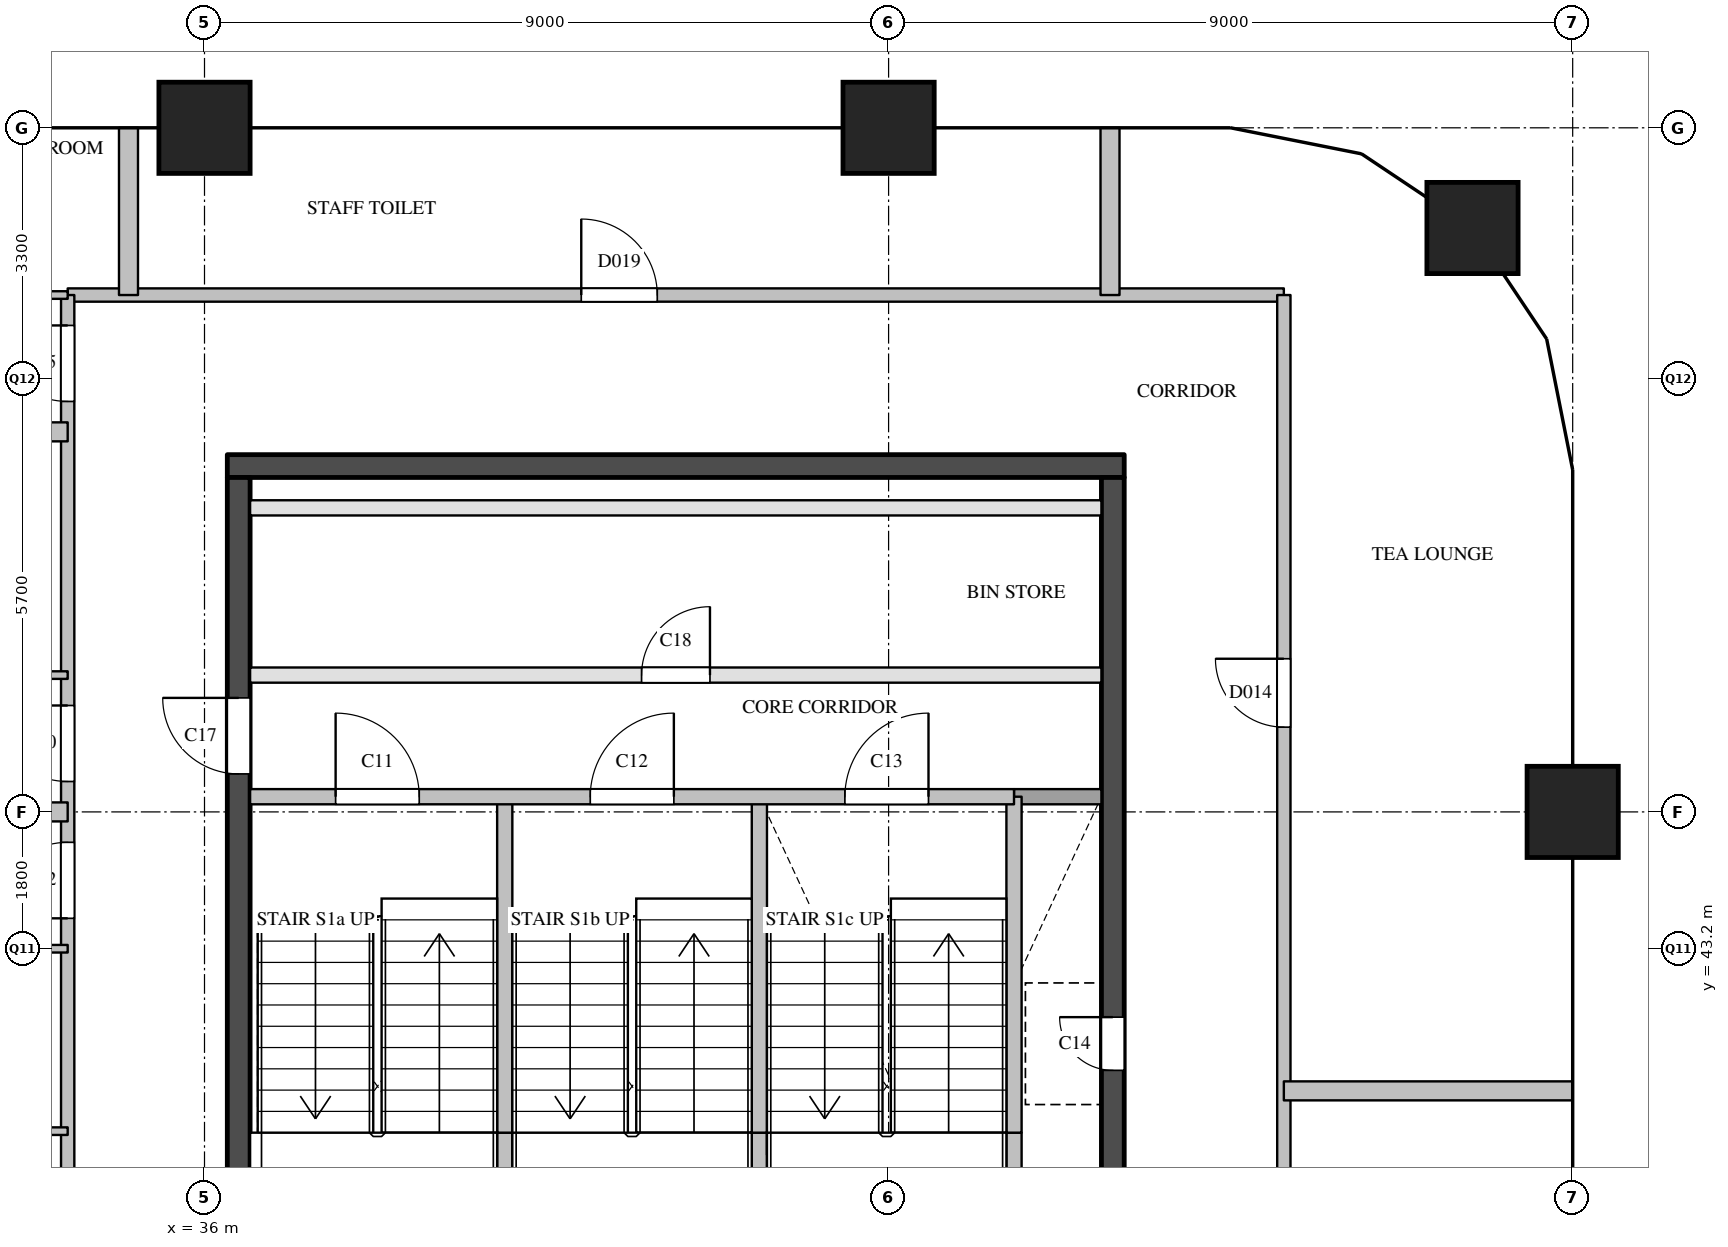
"""IFC4 building model, lengths in metres.
Left out: names, types, materials, properties, quantities, classifications, styles, units other than length and angle.
Written with IfcOpenShell. Run it as: python <this file> out.ifc"""

import sys

from ifc_helpers import new_model, si_unit, direction, frame, frame_2d, origin, origin_2d, place, context, subcontext, project, spatial, rectangle, extrude, element, fill, save


model = new_model("IFC4")
c1 = context("Model", 3, precision=1e-05, world=origin(), true_north=direction((0.0, 1.0)))
c2 = subcontext(c1, "Body", "Model", "MODEL_VIEW")
j1 = project(units=[si_unit("LENGTHUNIT", "METRE"), si_unit("PLANEANGLEUNIT", "RADIAN")], contexts=[c1])
p1 = place(None, origin())
s1 = spatial("IfcSite", under=j1, at=p1, CompositionType="ELEMENT")
p2 = place(p1, origin())
s2 = spatial("IfcBuilding", under=s1, at=p2, CompositionType="ELEMENT")
p3 = place(p2, frame((0.0, 0.0, 301.2)))
s3 = spatial("IfcBuildingStorey", under=s2, at=p3, CompositionType="ELEMENT", Elevation=301.2)
for number, where, z_axis, x_axis in (
    (1, (36.0, 54.0, 0.0), (0.0, 0.0, 1.0), (1.0, 0.0, 0.0)),
    (2, (45.0, 54.0, 0.0), (0.0, 0.0, 1.0), (1.0, 0.0, 0.0)),
    (3, (54.0, 45.0, 0.0), (0.0, 0.0, 1.0), (1.0, 0.0, 0.0)),
    (4, (52.682, 52.682, 0.0), (0.0, 0.0, 1.0), (1.0, 0.0, 0.0)),
):
    element("IfcColumn", number, at=place(p3, frame(where, z_axis=z_axis, x_axis=x_axis)), inside=s3, PredefinedType="COLUMN", context=c2, shape_type="SweptSolid", body=[
        extrude(rectangle(XDim=1.2, YDim=1.2, at=origin_2d()), origin(), (0.0, 0.0, 1.0), 3.9),
    ])
p4 = place(p3, frame((36.3, 49.55, 0.0), z_axis=(0.0, 0.0, 1.0), x_axis=(1.0, 0.0, 0.0)))
e5 = element("IfcWall", 5, at=p4, inside=s3, PredefinedType="SHEAR", context=c2, shape_type="SweptSolid", body=[
    extrude(rectangle(XDim=11.8, YDim=0.3, at=frame_2d((5.9, 0.0))), origin(), (0.0, 0.0, 1.0), 3.6),
])
p5 = place(p3, frame((36.45, 29.1, 0.0), z_axis=(0.0, 0.0, 1.0), x_axis=(0.0, 1.0, 0.0)))
e6 = element("IfcWall", 6, at=p5, inside=s3, PredefinedType="SHEAR", context=c2, shape_type="SweptSolid", body=[
    extrude(rectangle(XDim=20.3, YDim=0.3, at=frame_2d((10.15, 0.0))), origin(), (0.0, 0.0, 1.0), 3.6),
])
p6 = place(p5, frame((3.6, 0.0, 0.0)))
e7 = element("IfcOpeningElement", 7, at=p6, cuts=e6, PredefinedType="OPENING", context=c2, shape_type="SweptSolid", body=[
    extrude(rectangle(XDim=1.8, YDim=2.1, at=frame_2d((0.9, 1.05))), frame((0.0, 0.16, 0.0), z_axis=(0.0, -1.0, 0.0), x_axis=(1.0, 0.0, 0.0)), (0.0, 0.0, 1.0), 0.32),
])
p7 = place(p5, frame((16.4, 0.0, 0.0)))
e8 = element("IfcOpeningElement", 8, at=p7, cuts=e6, PredefinedType="OPENING", context=c2, shape_type="SweptSolid", body=[
    extrude(rectangle(XDim=1.0, YDim=2.1, at=frame_2d((0.5, 1.05))), frame((0.0, 0.16, 0.0), z_axis=(0.0, -1.0, 0.0), x_axis=(1.0, 0.0, 0.0)), (0.0, 0.0, 1.0), 0.32),
])
p8 = place(p3, frame((47.95, 29.1, 0.0), z_axis=(0.0, 0.0, 1.0), x_axis=(0.0, 1.0, 0.0)))
e9 = element("IfcWall", 9, at=p8, inside=s3, PredefinedType="SHEAR", context=c2, shape_type="SweptSolid", body=[
    extrude(rectangle(XDim=20.3, YDim=0.3, at=frame_2d((10.15, 0.0))), origin(), (0.0, 0.0, 1.0), 3.6),
])
p9 = place(p8, frame((12.5, 0.0, 0.0)))
e10 = element("IfcOpeningElement", 10, at=p9, cuts=e9, PredefinedType="OPENING", context=c2, shape_type="SweptSolid", body=[
    extrude(rectangle(XDim=0.7, YDim=2.1, at=frame_2d((0.35, 1.05))), frame((0.0, 0.16, 0.0), z_axis=(0.0, -1.0, 0.0), x_axis=(1.0, 0.0, 0.0)), (0.0, 0.0, 1.0), 0.32),
])
p10 = place(p8, frame((3.9, 0.0, 0.0)))
e11 = element("IfcOpeningElement", 11, at=p10, cuts=e9, PredefinedType="OPENING", context=c2, shape_type="SweptSolid", body=[
    extrude(rectangle(XDim=1.8, YDim=2.1, at=frame_2d((0.9, 1.05))), frame((0.0, 0.16, 0.0), z_axis=(0.0, -1.0, 0.0), x_axis=(1.0, 0.0, 0.0)), (0.0, 0.0, 1.0), 0.32),
])
p11 = place(p3, frame((39.95, 39.0, 0.0), z_axis=(0.0, 0.0, 1.0), x_axis=(0.0, 1.0, 0.0)))
e12 = element("IfcWall", 12, at=p11, inside=s3, PredefinedType="SOLIDWALL", context=c2, shape_type="SweptSolid", body=[
    extrude(rectangle(XDim=1.78, YDim=0.2, at=frame_2d((0.89, 0.0))), origin(), (0.0, 0.0, 1.0), 3.6),
])
p12 = place(p3, frame((39.95, 40.78, 0.0), z_axis=(0.0, 0.0, 1.0), x_axis=(0.0, 1.0, 0.0)))
e13 = element("IfcWall", 13, at=p12, inside=s3, PredefinedType="SOLIDWALL", context=c2, shape_type="SweptSolid", body=[
    extrude(rectangle(XDim=4.42, YDim=0.2, at=frame_2d((2.21, 0.0))), origin(), (0.0, 0.0, 1.0), 3.6),
])
p13 = place(p3, frame((43.3, 39.0, 0.0), z_axis=(0.0, 0.0, 1.0), x_axis=(0.0, 1.0, 0.0)))
e14 = element("IfcWall", 14, at=p13, inside=s3, PredefinedType="SOLIDWALL", context=c2, shape_type="SweptSolid", body=[
    extrude(rectangle(XDim=1.78, YDim=0.2, at=frame_2d((0.89, 0.0))), origin(), (0.0, 0.0, 1.0), 3.6),
])
p14 = place(p3, frame((43.3, 40.78, 0.0), z_axis=(0.0, 0.0, 1.0), x_axis=(0.0, 1.0, 0.0)))
e15 = element("IfcWall", 15, at=p14, inside=s3, PredefinedType="SOLIDWALL", context=c2, shape_type="SweptSolid", body=[
    extrude(rectangle(XDim=4.42, YDim=0.2, at=frame_2d((2.21, 0.0))), origin(), (0.0, 0.0, 1.0), 3.6),
])
p15 = place(p3, frame((46.65, 39.0, 0.0), z_axis=(0.0, 0.0, 1.0), x_axis=(0.0, 1.0, 0.0)))
e16 = element("IfcWall", 16, at=p15, inside=s3, PredefinedType="SOLIDWALL", context=c2, shape_type="SweptSolid", body=[
    extrude(rectangle(XDim=1.78, YDim=0.2, at=frame_2d((0.89, 0.0))), origin(), (0.0, 0.0, 1.0), 3.6),
])
p16 = place(p3, frame((46.65, 40.78, 0.0), z_axis=(0.0, 0.0, 1.0), x_axis=(0.0, 1.0, 0.0)))
e17 = element("IfcWall", 17, at=p16, inside=s3, PredefinedType="SOLIDWALL", context=c2, shape_type="SweptSolid", body=[
    extrude(rectangle(XDim=4.42, YDim=0.2, at=frame_2d((2.21, 0.0))), origin(), (0.0, 0.0, 1.0), 3.6),
])
p17 = place(p3, frame((46.65, 45.2, 0.0), z_axis=(0.0, 0.0, 1.0), x_axis=(1.0, 0.0, 0.0)))
e18 = element("IfcWall", 18, at=p17, inside=s3, PredefinedType="SOLIDWALL", context=c2, shape_type="SweptSolid", body=[
    extrude(rectangle(XDim=1.15, YDim=0.2, at=frame_2d((0.575, 0.0))), origin(), (0.0, 0.0, 1.0), 3.6),
])
p18 = place(p3, frame((36.6, 45.2, 0.0), z_axis=(0.0, 0.0, 1.0), x_axis=(1.0, 0.0, 0.0)))
e19 = element("IfcWall", 19, at=p18, inside=s3, PredefinedType="SOLIDWALL", context=c2, shape_type="SweptSolid", body=[
    extrude(rectangle(XDim=10.05, YDim=0.2, at=frame_2d((5.025, 0.0))), origin(), (0.0, 0.0, 1.0), 3.6),
])
p19 = place(p18, frame((1.125, 0.0, 0.0)))
e20 = element("IfcOpeningElement", 20, at=p19, cuts=e19, PredefinedType="OPENING", context=c2, shape_type="SweptSolid", body=[
    extrude(rectangle(XDim=1.1, YDim=2.1, at=frame_2d((0.55, 1.05))), frame((0.0, 0.11, 0.0), z_axis=(0.0, -1.0, 0.0), x_axis=(1.0, 0.0, 0.0)), (0.0, 0.0, 1.0), 0.22),
])
p20 = place(p18, frame((4.475, 0.0, 0.0)))
e21 = element("IfcOpeningElement", 21, at=p20, cuts=e19, PredefinedType="OPENING", context=c2, shape_type="SweptSolid", body=[
    extrude(rectangle(XDim=1.1, YDim=2.1, at=frame_2d((0.55, 1.05))), frame((0.0, 0.11, 0.0), z_axis=(0.0, -1.0, 0.0), x_axis=(1.0, 0.0, 0.0)), (0.0, 0.0, 1.0), 0.22),
])
p21 = place(p18, frame((7.825, 0.0, 0.0)))
e22 = element("IfcOpeningElement", 22, at=p21, cuts=e19, PredefinedType="OPENING", context=c2, shape_type="SweptSolid", body=[
    extrude(rectangle(XDim=1.1, YDim=2.1, at=frame_2d((0.55, 1.05))), frame((0.0, 0.11, 0.0), z_axis=(0.0, -1.0, 0.0), x_axis=(1.0, 0.0, 0.0)), (0.0, 0.0, 1.0), 0.22),
])
p22 = place(p3, frame((36.6, 46.8, 0.0), z_axis=(0.0, 0.0, 1.0), x_axis=(1.0, 0.0, 0.0)))
e23 = element("IfcWall", 23, at=p22, inside=s3, PredefinedType="PARTITIONING", context=c2, shape_type="SweptSolid", body=[
    extrude(rectangle(XDim=11.2, YDim=0.2, at=frame_2d((5.6, 0.0))), origin(), (0.0, 0.0, 1.0), 3.6),
])
p23 = place(p22, frame((5.15, 0.0, 0.0)))
e24 = element("IfcOpeningElement", 24, at=p23, cuts=e23, PredefinedType="OPENING", context=c2, shape_type="SweptSolid", body=[
    extrude(rectangle(XDim=0.9, YDim=2.1, at=frame_2d((0.45, 1.05))), frame((0.0, 0.11, 0.0), z_axis=(0.0, -1.0, 0.0), x_axis=(1.0, 0.0, 0.0)), (0.0, 0.0, 1.0), 0.22),
])
p24 = place(p3, frame((36.6, 49.0, 0.0), z_axis=(0.0, 0.0, 1.0), x_axis=(1.0, 0.0, 0.0)))
e25 = element("IfcWall", 25, at=p24, inside=s3, PredefinedType="PARTITIONING", context=c2, shape_type="SweptSolid", body=[
    extrude(rectangle(XDim=11.2, YDim=0.2, at=frame_2d((5.6, 0.0))), origin(), (0.0, 0.0, 1.0), 3.6),
])
p25 = place(p3, frame((34.2, 51.8, 0.0), z_axis=(0.0, 0.0, 1.0), x_axis=(1.0, 0.0, 0.0)))
e26 = element("IfcWall", 26, at=p25, inside=s3, PredefinedType="PARTITIONING", context=c2, shape_type="SweptSolid", body=[
    extrude(rectangle(XDim=16.0, YDim=0.175, at=frame_2d((8.0, 0.0))), origin(), (0.0, 0.0, 1.0), 3.6),
])
p26 = place(p25, frame((6.757, 0.0, 0.0)))
e27 = element("IfcOpeningElement", 27, at=p26, cuts=e26, PredefinedType="OPENING", context=c2, shape_type="SweptSolid", body=[
    extrude(rectangle(XDim=1.0, YDim=2.1, at=frame_2d((0.5, 1.05))), frame((0.0, 0.097, 0.0), z_axis=(0.0, -1.0, 0.0), x_axis=(1.0, 0.0, 0.0)), (0.0, 0.0, 1.0), 0.195),
])
p27 = place(p3, frame((34.2, 28.5, 0.0), z_axis=(0.0, 0.0, 1.0), x_axis=(0.0, 1.0, 0.0)))
e28 = element("IfcWall", 28, at=p27, inside=s3, PredefinedType="PARTITIONING", context=c2, shape_type="SweptSolid", body=[
    extrude(rectangle(XDim=23.3, YDim=0.175, at=frame_2d((11.65, 0.0))), origin(), (0.0, 0.0, 1.0), 3.6),
])
p28 = place(p27, frame((15.1, 0.0, 0.0)))
e29 = element("IfcOpeningElement", 29, at=p28, cuts=e28, PredefinedType="OPENING", context=c2, shape_type="SweptSolid", body=[
    extrude(rectangle(XDim=1.0, YDim=2.1, at=frame_2d((0.5, 1.05))), frame((0.0, 0.097, 0.0), z_axis=(0.0, -1.0, 0.0), x_axis=(1.0, 0.0, 0.0)), (0.0, 0.0, 1.0), 0.195),
])
p29 = place(p27, frame((16.9, 0.0, 0.0)))
e30 = element("IfcOpeningElement", 30, at=p29, cuts=e28, PredefinedType="OPENING", context=c2, shape_type="SweptSolid", body=[
    extrude(rectangle(XDim=1.0, YDim=2.1, at=frame_2d((0.5, 1.05))), frame((0.0, 0.097, 0.0), z_axis=(0.0, -1.0, 0.0), x_axis=(1.0, 0.0, 0.0)), (0.0, 0.0, 1.0), 0.195),
])
p30 = place(p27, frame((21.9, 0.0, 0.0)))
e31 = element("IfcOpeningElement", 31, at=p30, cuts=e28, PredefinedType="OPENING", context=c2, shape_type="SweptSolid", body=[
    extrude(rectangle(XDim=1.0, YDim=2.1, at=frame_2d((0.5, 1.05))), frame((0.0, 0.097, 0.0), z_axis=(0.0, -1.0, 0.0), x_axis=(1.0, 0.0, 0.0)), (0.0, 0.0, 1.0), 0.195),
])
p31 = place(p3, frame((50.2, 28.5, 0.0), z_axis=(0.0, 0.0, 1.0), x_axis=(0.0, 1.0, 0.0)))
e32 = element("IfcWall", 32, at=p31, inside=s3, PredefinedType="PARTITIONING", context=c2, shape_type="SweptSolid", body=[
    extrude(rectangle(XDim=23.3, YDim=0.175, at=frame_2d((11.65, 0.0))), origin(), (0.0, 0.0, 1.0), 3.6),
])
p32 = place(p31, frame((5.965, 0.0, 0.0)))
e33 = element("IfcOpeningElement", 33, at=p32, cuts=e32, PredefinedType="OPENING", context=c2, shape_type="SweptSolid", body=[
    extrude(rectangle(XDim=0.9, YDim=2.1, at=frame_2d((0.45, 1.05))), frame((0.0, 0.097, 0.0), z_axis=(0.0, -1.0, 0.0), x_axis=(1.0, 0.0, 0.0)), (0.0, 0.0, 1.0), 0.195),
])
p33 = place(p31, frame((17.615, 0.0, 0.0)))
e34 = element("IfcOpeningElement", 34, at=p33, cuts=e32, PredefinedType="OPENING", context=c2, shape_type="SweptSolid", body=[
    extrude(rectangle(XDim=0.9, YDim=2.1, at=frame_2d((0.45, 1.05))), frame((0.0, 0.097, 0.0), z_axis=(0.0, -1.0, 0.0), x_axis=(1.0, 0.0, 0.0)), (0.0, 0.0, 1.0), 0.195),
])
p34 = place(p3, frame((50.2, 41.33, 0.0), z_axis=(0.0, 0.0, 1.0), x_axis=(1.0, 0.0, 0.0)))
e35 = element("IfcWall", 35, at=p34, inside=s3, PredefinedType="PARTITIONING", context=c2, shape_type="SweptSolid", body=[
    extrude(rectangle(XDim=3.8, YDim=0.25, at=frame_2d((1.9, 0.0))), origin(), (0.0, 0.0, 1.0), 2.6),
])
p35 = place(p3, frame((18.0, 45.0, 0.0), z_axis=(0.0, 0.0, 1.0), x_axis=(1.0, 0.0, 0.0)))
e36 = element("IfcWall", 36, at=p35, inside=s3, PredefinedType="PARTITIONING", context=c2, shape_type="SweptSolid", body=[
    extrude(rectangle(XDim=16.2, YDim=0.25, at=frame_2d((8.1, 0.0))), origin(), (0.0, 0.0, 1.0), 3.6),
])
p36 = place(p3, frame((18.1, 50.0, 0.0), z_axis=(0.0, 0.0, 1.0), x_axis=(1.0, 0.0, 0.0)))
e37 = element("IfcWall", 37, at=p36, inside=s3, PredefinedType="PARTITIONING", context=c2, shape_type="SweptSolid", body=[
    extrude(rectangle(XDim=16.1, YDim=0.25, at=frame_2d((8.05, 0.0))), origin(), (0.0, 0.0, 1.0), 2.6),
])
for number, where, z_axis, x_axis in (
    (38, (35.0, 51.8, 0.0), (0.0, 0.0, 1.0), (0.0, 1.0, 0.0)),
    (39, (47.913, 51.8, 0.0), (0.0, 0.0, 1.0), (0.0, 1.0, 0.0)),
):
    element("IfcWall", number, at=place(p3, frame(where, z_axis=z_axis, x_axis=x_axis)), inside=s3, PredefinedType="PARTITIONING", context=c2, shape_type="SweptSolid", body=[
        extrude(rectangle(XDim=2.2, YDim=0.25, at=frame_2d((1.1, 0.0))), origin(), (0.0, 0.0, 1.0), 2.6),
    ])
p37 = place(p3, frame((32.6, 40.8, 0.0), z_axis=(0.0, 0.0, 1.0), x_axis=(1.0, 0.0, 0.0)))
e40 = element("IfcWall", 40, at=p37, inside=s3, PredefinedType="PARTITIONING", context=c2, shape_type="SweptSolid", body=[
    extrude(rectangle(XDim=1.6, YDim=0.1, at=frame_2d((0.8, 0.0))), origin(), (0.0, 0.0, 1.0), 3.6),
])
p38 = place(p3, frame((32.6, 43.2, 0.0), z_axis=(0.0, 0.0, 1.0), x_axis=(1.0, 0.0, 0.0)))
e41 = element("IfcWall", 41, at=p38, inside=s3, PredefinedType="PARTITIONING", context=c2, shape_type="SweptSolid", body=[
    extrude(rectangle(XDim=1.6, YDim=0.1, at=frame_2d((0.8, 0.0))), origin(), (0.0, 0.0, 1.0), 3.6),
])
p39 = place(p38, frame((0.4, 0.0, 0.0)))
e42 = element("IfcOpeningElement", 42, at=p39, cuts=e41, PredefinedType="OPENING", context=c2, shape_type="SweptSolid", body=[
    extrude(rectangle(XDim=0.8, YDim=2.1, at=frame_2d((0.4, 1.05))), frame((0.0, 0.06, 0.0), z_axis=(0.0, -1.0, 0.0), x_axis=(1.0, 0.0, 0.0)), (0.0, 0.0, 1.0), 0.12),
])
p40 = place(p3, frame((31.8, 46.8, 0.0), z_axis=(0.0, 0.0, 1.0), x_axis=(1.0, 0.0, 0.0)))
e43 = element("IfcWall", 43, at=p40, inside=s3, PredefinedType="PARTITIONING", context=c2, shape_type="SweptSolid", body=[
    extrude(rectangle(XDim=2.4, YDim=0.1, at=frame_2d((1.2, 0.0))), origin(), (0.0, 0.0, 1.0), 3.6),
])
p41 = place(p40, frame((0.8, 0.0, 0.0)))
e44 = element("IfcOpeningElement", 44, at=p41, cuts=e43, PredefinedType="OPENING", context=c2, shape_type="SweptSolid", body=[
    extrude(rectangle(XDim=0.8, YDim=2.1, at=frame_2d((0.4, 1.05))), frame((0.0, 0.06, 0.0), z_axis=(0.0, -1.0, 0.0), x_axis=(1.0, 0.0, 0.0)), (0.0, 0.0, 1.0), 0.12),
])
p42 = place(p3, frame((32.6, 51.8, 0.0), z_axis=(0.0, 0.0, 1.0), x_axis=(1.0, 0.0, 0.0)))
e45 = element("IfcWall", 45, at=p42, inside=s3, PredefinedType="PARTITIONING", context=c2, shape_type="SweptSolid", body=[
    extrude(rectangle(XDim=1.6, YDim=0.1, at=frame_2d((0.8, 0.0))), origin(), (0.0, 0.0, 1.0), 3.6),
])
p43 = place(p42, frame((0.4, 0.0, 0.0)))
e46 = element("IfcOpeningElement", 46, at=p43, cuts=e45, PredefinedType="OPENING", context=c2, shape_type="SweptSolid", body=[
    extrude(rectangle(XDim=0.8, YDim=2.1, at=frame_2d((0.4, 1.05))), frame((0.0, 0.06, 0.0), z_axis=(0.0, -1.0, 0.0), x_axis=(1.0, 0.0, 0.0)), (0.0, 0.0, 1.0), 0.12),
])
p44 = place(p19, origin())
e47 = element("IfcDoor", 47, at=p44, inside=s3, OperationType="SINGLE_SWING_LEFT", PredefinedType="DOOR", context=c2, shape_type="SweptSolid", body=[
    extrude(rectangle(XDim=1.1, YDim=2.1, at=frame_2d((0.55, 1.05))), frame((0.0, 0.025, 0.0), z_axis=(0.0, -1.0, 0.0), x_axis=(1.0, 0.0, 0.0)), (0.0, 0.0, 1.0), 0.05),
])
fill(e20, e47)
p45 = place(p20, origin())
e48 = element("IfcDoor", 48, at=p45, inside=s3, OperationType="SINGLE_SWING_RIGHT", PredefinedType="DOOR", context=c2, shape_type="SweptSolid", body=[
    extrude(rectangle(XDim=1.1, YDim=2.1, at=frame_2d((0.55, 1.05))), frame((0.0, 0.025, 0.0), z_axis=(0.0, -1.0, 0.0), x_axis=(1.0, 0.0, 0.0)), (0.0, 0.0, 1.0), 0.05),
])
fill(e21, e48)
p46 = place(p21, origin())
e49 = element("IfcDoor", 49, at=p46, inside=s3, OperationType="SINGLE_SWING_RIGHT", PredefinedType="DOOR", context=c2, shape_type="SweptSolid", body=[
    extrude(rectangle(XDim=1.1, YDim=2.1, at=frame_2d((0.55, 1.05))), frame((0.0, 0.025, 0.0), z_axis=(0.0, -1.0, 0.0), x_axis=(1.0, 0.0, 0.0)), (0.0, 0.0, 1.0), 0.05),
])
fill(e22, e49)
p47 = place(p9, origin())
e50 = element("IfcDoor", 50, at=p47, inside=s3, OperationType="SINGLE_SWING_RIGHT", PredefinedType="DOOR", context=c2, shape_type="SweptSolid", body=[
    extrude(rectangle(XDim=0.7, YDim=2.1, at=frame_2d((0.35, 1.05))), frame((0.0, 0.025, 0.0), z_axis=(0.0, -1.0, 0.0), x_axis=(1.0, 0.0, 0.0)), (0.0, 0.0, 1.0), 0.05),
])
fill(e10, e50)
p48 = place(p7, origin())
e51 = element("IfcDoor", 51, at=p48, inside=s3, OperationType="SINGLE_SWING_RIGHT", PredefinedType="DOOR", context=c2, shape_type="SweptSolid", body=[
    extrude(rectangle(XDim=1.0, YDim=2.1, at=frame_2d((0.5, 1.05))), frame((0.0, 0.025, 0.0), z_axis=(0.0, -1.0, 0.0), x_axis=(1.0, 0.0, 0.0)), (0.0, 0.0, 1.0), 0.05),
])
fill(e8, e51)
p49 = place(p23, origin())
e52 = element("IfcDoor", 52, at=p49, inside=s3, OperationType="SINGLE_SWING_RIGHT", PredefinedType="DOOR", context=c2, shape_type="SweptSolid", body=[
    extrude(rectangle(XDim=0.9, YDim=2.1, at=frame_2d((0.45, 1.05))), frame((0.0, 0.025, 0.0), z_axis=(0.0, -1.0, 0.0), x_axis=(1.0, 0.0, 0.0)), (0.0, 0.0, 1.0), 0.05),
])
fill(e24, e52)
p50 = place(p28, origin())
e53 = element("IfcDoor", 53, at=p50, inside=s3, OperationType="SINGLE_SWING_LEFT", PredefinedType="DOOR", context=c2, shape_type="SweptSolid", body=[
    extrude(rectangle(XDim=1.0, YDim=2.1, at=frame_2d((0.5, 1.05))), frame((0.0, 0.025, 0.0), z_axis=(0.0, -1.0, 0.0), x_axis=(1.0, 0.0, 0.0)), (0.0, 0.0, 1.0), 0.05),
])
fill(e29, e53)
p51 = place(p29, origin())
e54 = element("IfcDoor", 54, at=p51, inside=s3, OperationType="SINGLE_SWING_RIGHT", PredefinedType="DOOR", context=c2, shape_type="SweptSolid", body=[
    extrude(rectangle(XDim=1.0, YDim=2.1, at=frame_2d((0.5, 1.05))), frame((0.0, 0.025, 0.0), z_axis=(0.0, -1.0, 0.0), x_axis=(1.0, 0.0, 0.0)), (0.0, 0.0, 1.0), 0.05),
])
fill(e30, e54)
p52 = place(p33, origin())
e55 = element("IfcDoor", 55, at=p52, inside=s3, OperationType="SINGLE_SWING_RIGHT", PredefinedType="DOOR", context=c2, shape_type="SweptSolid", body=[
    extrude(rectangle(XDim=0.9, YDim=2.1, at=frame_2d((0.45, 1.05))), frame((0.0, 0.025, 0.0), z_axis=(0.0, -1.0, 0.0), x_axis=(1.0, 0.0, 0.0)), (0.0, 0.0, 1.0), 0.05),
])
fill(e34, e55)
p53 = place(p30, origin())
e56 = element("IfcDoor", 56, at=p53, inside=s3, OperationType="SINGLE_SWING_RIGHT", PredefinedType="DOOR", context=c2, shape_type="SweptSolid", body=[
    extrude(rectangle(XDim=1.0, YDim=2.1, at=frame_2d((0.5, 1.05))), frame((0.0, 0.025, 0.0), z_axis=(0.0, -1.0, 0.0), x_axis=(1.0, 0.0, 0.0)), (0.0, 0.0, 1.0), 0.05),
])
fill(e31, e56)
p54 = place(p26, origin())
e57 = element("IfcDoor", 57, at=p54, inside=s3, OperationType="SINGLE_SWING_LEFT", PredefinedType="DOOR", context=c2, shape_type="SweptSolid", body=[
    extrude(rectangle(XDim=1.0, YDim=2.1, at=frame_2d((0.5, 1.05))), frame((0.0, 0.025, 0.0), z_axis=(0.0, -1.0, 0.0), x_axis=(1.0, 0.0, 0.0)), (0.0, 0.0, 1.0), 0.05),
])
fill(e27, e57)
save(model, sys.argv[1])
